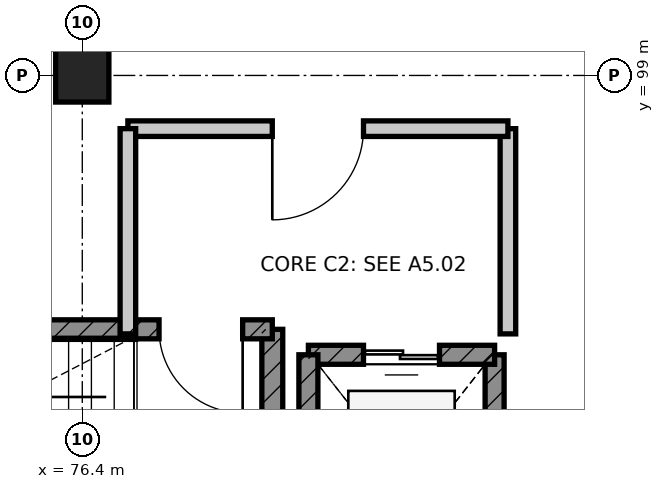
"""IFC4 building model, lengths in metres.
Left out: names, types, materials, properties, quantities, classifications, styles, units other than length and angle.
Written with IfcOpenShell. Run it as: python <this file> out.ifc"""

import sys

from ifc_helpers import new_model, si_unit, direction, frame, frame_2d, origin, origin_2d, place, context, subcontext, project, spatial, rectangle, extrude, element, fill, save


model = new_model("IFC4")
c1 = context("Model", 3, precision=1e-05, world=origin(), true_north=direction((0.0, 1.0)))
c2 = subcontext(c1, "Body", "Model", "MODEL_VIEW")
j1 = project(units=[si_unit("LENGTHUNIT", "METRE"), si_unit("PLANEANGLEUNIT", "RADIAN")], contexts=[c1])
p1 = place(None, origin())
s1 = spatial("IfcSite", under=j1, at=p1, CompositionType="ELEMENT")
p2 = place(p1, origin())
s2 = spatial("IfcBuilding", under=s1, at=p2, CompositionType="ELEMENT")
p3 = place(p2, frame((0.0, 0.0, 26.4)))
s3 = spatial("IfcBuildingStorey", under=s2, at=p3, CompositionType="ELEMENT", Elevation=26.4)
p4 = place(p3, frame((76.4, 99.0, 0.0), z_axis=(0.0, 0.0, 1.0), x_axis=(1.0, 0.0, 0.0)))
e1 = element("IfcColumn", 1, at=p4, inside=s3, PredefinedType="COLUMN", context=c2, shape_type="SweptSolid", body=[
    extrude(rectangle(XDim=0.7, YDim=0.7, at=origin_2d()), origin(), (0.0, 0.0, 1.0), 3.6),
])
p5 = place(p3, frame((78.9, 92.1, 0.0), z_axis=(0.0, 0.0, 1.0), x_axis=(0.0, 1.0, 0.0)))
e2 = element("IfcWall", 2, at=p5, inside=s3, PredefinedType="SHEAR", context=c2, shape_type="SweptSolid", body=[
    extrude(rectangle(XDim=3.56, YDim=0.275, at=frame_2d((1.78, 0.0))), origin(), (0.0, 0.0, 1.0), 3.35),
])
p6 = place(p3, frame((78.9, 95.66, 0.0), z_axis=(0.0, 0.0, 1.0), x_axis=(-1.0, 0.0, 0.0)))
e3 = element("IfcWall", 3, at=p6, inside=s3, PredefinedType="SHEAR", context=c2, shape_type="SweptSolid", body=[
    extrude(rectangle(XDim=8.4, YDim=0.25, at=frame_2d((4.2, 0.0))), origin(), (0.0, 0.0, 1.0), 3.35),
])
p7 = place(p6, frame((0.39, 0.0, 0.0)))
e4 = element("IfcOpeningElement", 4, at=p7, cuts=e3, PredefinedType="OPENING", context=c2, shape_type="SweptSolid", body=[
    extrude(rectangle(XDim=1.1, YDim=2.1, at=frame_2d((0.55, 1.05))), frame((0.0, 0.135, 0.0), z_axis=(0.0, -1.0, 0.0), x_axis=(1.0, 0.0, 0.0)), (0.0, 0.0, 1.0), 0.27),
])
p8 = place(p3, frame((81.825, 92.275, 0.0), z_axis=(0.0, 0.0, 1.0), x_axis=(0.0, 1.0, 0.0)))
e5 = element("IfcWall", 5, at=p8, inside=s3, PredefinedType="SHEAR", context=c2, shape_type="SweptSolid", body=[
    extrude(rectangle(XDim=3.05, YDim=0.25, at=frame_2d((1.525, 0.0))), origin(), (0.0, 0.0, 1.0), 3.35),
])
p9 = place(p3, frame((81.825, 95.325, 0.0), z_axis=(0.0, 0.0, 1.0), x_axis=(-1.0, 0.0, 0.0)))
e6 = element("IfcWall", 6, at=p9, inside=s3, PredefinedType="SHEAR", context=c2, shape_type="SweptSolid", body=[
    extrude(rectangle(XDim=2.45, YDim=0.25, at=frame_2d((1.225, 0.0))), origin(), (0.0, 0.0, 1.0), 3.35),
])
p10 = place(p9, frame((0.725, 0.0, 0.0)))
e7 = element("IfcOpeningElement", 7, at=p10, cuts=e6, PredefinedType="OPENING", context=c2, shape_type="SweptSolid", body=[
    extrude(rectangle(XDim=1.0, YDim=2.15, at=frame_2d((0.5, 1.075))), frame((0.0, 0.135, 0.0), z_axis=(0.0, -1.0, 0.0), x_axis=(1.0, 0.0, 0.0)), (0.0, 0.0, 1.0), 0.27),
])
p11 = place(p3, frame((79.375, 95.325, 0.0), z_axis=(0.0, 0.0, 1.0), x_axis=(0.0, -1.0, 0.0)))
e8 = element("IfcWall", 8, at=p11, inside=s3, PredefinedType="SHEAR", context=c2, shape_type="SweptSolid", body=[
    extrude(rectangle(XDim=3.05, YDim=0.25, at=frame_2d((1.525, 0.0))), origin(), (0.0, 0.0, 1.0), 3.35),
])
p12 = place(p3, frame((82.0, 95.6, 0.0), z_axis=(0.0, 0.0, 1.0), x_axis=(0.0, 1.0, 0.0)))
e9 = element("IfcWall", 9, at=p12, inside=s3, PredefinedType="PARTITIONING", context=c2, shape_type="SweptSolid", body=[
    extrude(rectangle(XDim=2.7, YDim=0.205, at=frame_2d((1.35, 0.0))), origin(), (0.0, 0.0, 1.0), 3.35),
])
p13 = place(p3, frame((82.0, 98.3, 0.0), z_axis=(0.0, 0.0, 1.0), x_axis=(-1.0, 0.0, 0.0)))
e10 = element("IfcWall", 10, at=p13, inside=s3, PredefinedType="PARTITIONING", context=c2, shape_type="SweptSolid", body=[
    extrude(rectangle(XDim=5.0, YDim=0.205, at=frame_2d((2.5, 0.0))), origin(), (0.0, 0.0, 1.0), 3.35),
])
p14 = place(p13, frame((1.9, 0.0, 0.0)))
e11 = element("IfcOpeningElement", 11, at=p14, cuts=e10, PredefinedType="OPENING", context=c2, shape_type="SweptSolid", body=[
    extrude(rectangle(XDim=1.2, YDim=2.1, at=frame_2d((0.6, 1.05))), frame((0.0, 0.113, 0.0), z_axis=(0.0, -1.0, 0.0), x_axis=(1.0, 0.0, 0.0)), (0.0, 0.0, 1.0), 0.225),
])
p15 = place(p3, frame((77.0, 98.3, 0.0), z_axis=(0.0, 0.0, 1.0), x_axis=(0.0, -1.0, 0.0)))
e12 = element("IfcWall", 12, at=p15, inside=s3, PredefinedType="PARTITIONING", context=c2, shape_type="SweptSolid", body=[
    extrude(rectangle(XDim=2.7, YDim=0.205, at=frame_2d((1.35, 0.0))), origin(), (0.0, 0.0, 1.0), 3.35),
])
p16 = place(p7, origin())
e13 = element("IfcDoor", 13, at=p16, inside=s3, OperationType="SINGLE_SWING_LEFT", PredefinedType="DOOR", context=c2, shape_type="SweptSolid", body=[
    extrude(rectangle(XDim=1.1, YDim=2.1, at=frame_2d((0.55, 1.05))), frame((0.0, 0.025, 0.0), z_axis=(0.0, -1.0, 0.0), x_axis=(1.0, 0.0, 0.0)), (0.0, 0.0, 1.0), 0.05),
])
fill(e4, e13)
p17 = place(p10, origin())
e14 = element("IfcDoor", 14, at=p17, inside=s3, OperationType="DOUBLE_DOOR_SLIDING", PredefinedType="DOOR", context=c2, shape_type="SweptSolid", body=[
    extrude(rectangle(XDim=1.0, YDim=2.15, at=frame_2d((0.5, 1.075))), frame((0.0, 0.025, 0.0), z_axis=(0.0, -1.0, 0.0), x_axis=(1.0, 0.0, 0.0)), (0.0, 0.0, 1.0), 0.05),
])
fill(e7, e14)
p18 = place(p14, origin())
e15 = element("IfcDoor", 15, at=p18, inside=s3, OperationType="SINGLE_SWING_RIGHT", PredefinedType="DOOR", context=c2, shape_type="SweptSolid", body=[
    extrude(rectangle(XDim=1.2, YDim=2.1, at=frame_2d((0.6, 1.05))), frame((0.0, 0.025, 0.0), z_axis=(0.0, -1.0, 0.0), x_axis=(1.0, 0.0, 0.0)), (0.0, 0.0, 1.0), 0.05),
])
fill(e11, e15)
save(model, sys.argv[1])
